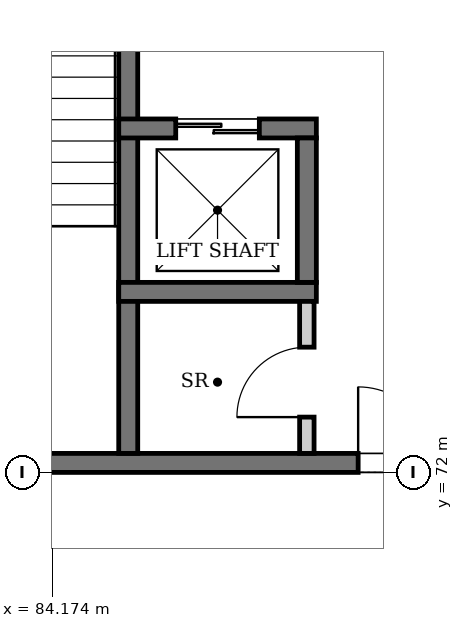
"""IFC4 building model, lengths in metres.
Left out: names, types, materials, properties, quantities, classifications, styles, units other than length and angle.
Written with IfcOpenShell. Run it as: python <this file> out.ifc"""

import sys

from ifc_helpers import new_model, si_unit, direction, frame, frame_2d, origin, place, context, subcontext, project, spatial, rectangle, extrude, element, fill, save


model = new_model("IFC4")
c1 = context("Model", 3, precision=1e-05, world=origin(), true_north=direction((0.0, 1.0)))
c2 = subcontext(c1, "Body", "Model", "MODEL_VIEW")
j1 = project(units=[si_unit("LENGTHUNIT", "METRE"), si_unit("PLANEANGLEUNIT", "RADIAN")], contexts=[c1])
p1 = place(None, origin())
s1 = spatial("IfcSite", under=j1, at=p1, CompositionType="ELEMENT")
p2 = place(p1, origin())
s2 = spatial("IfcBuilding", under=s1, at=p2, CompositionType="ELEMENT")
p3 = place(p2, frame((0.0, 0.0, 6.0)))
s3 = spatial("IfcBuildingStorey", under=s2, at=p3, CompositionType="ELEMENT", Elevation=6.0)
p4 = place(p3, frame((81.25, 72.125, 0.0), z_axis=(0.0, 0.0, 1.0), x_axis=(1.0, 0.0, 0.0)))
e1 = element("IfcWall", 1, at=p4, inside=s3, PredefinedType="SHEAR", context=c2, shape_type="SweptSolid", body=[
    extrude(rectangle(XDim=8.5, YDim=0.25, at=frame_2d((4.25, 0.0))), origin(), (0.0, 0.0, 1.0), 4.5),
])
p5 = place(p4, frame((6.95, 0.0, 0.0)))
e2 = element("IfcOpeningElement", 2, at=p5, cuts=e1, PredefinedType="OPENING", context=c2, shape_type="SweptSolid", body=[
    extrude(rectangle(XDim=1.0, YDim=2.1, at=frame_2d((0.5, 1.05))), frame((0.0, 0.135, 0.0), z_axis=(0.0, -1.0, 0.0), x_axis=(1.0, 0.0, 0.0)), (0.0, 0.0, 1.0), 0.27),
])
p6 = place(p3, frame((85.175, 80.4, 0.0), z_axis=(0.0, 0.0, 1.0), x_axis=(0.0, -1.0, 0.0)))
e3 = element("IfcWall", 3, at=p6, inside=s3, PredefinedType="SOLIDWALL", context=c2, shape_type="SweptSolid", body=[
    extrude(rectangle(XDim=8.15, YDim=0.25, at=frame_2d((4.075, 0.0))), origin(), (0.0, 0.0, 1.0), 4.25),
])
p7 = place(p6, frame((0.4, 0.0, 0.0)))
e4 = element("IfcOpeningElement", 4, at=p7, cuts=e3, PredefinedType="OPENING", context=c2, shape_type="SweptSolid", body=[
    extrude(rectangle(XDim=1.0, YDim=2.1, at=frame_2d((0.5, 1.05))), frame((0.0, 0.135, 0.0), z_axis=(0.0, -1.0, 0.0), x_axis=(1.0, 0.0, 0.0)), (0.0, 0.0, 1.0), 0.27),
])
p8 = place(p3, frame((85.05, 74.375, 0.0), z_axis=(0.0, 0.0, 1.0), x_axis=(1.0, 0.0, 0.0)))
e5 = element("IfcWall", 5, at=p8, inside=s3, PredefinedType="SOLIDWALL", context=c2, shape_type="SweptSolid", body=[
    extrude(rectangle(XDim=2.6, YDim=0.25, at=frame_2d((1.3, 0.0))), origin(), (0.0, 0.0, 1.0), 4.5),
])
p9 = place(p3, frame((85.05, 76.525, 0.0), z_axis=(0.0, 0.0, 1.0), x_axis=(1.0, 0.0, 0.0)))
e6 = element("IfcWall", 6, at=p9, inside=s3, PredefinedType="SOLIDWALL", context=c2, shape_type="SweptSolid", body=[
    extrude(rectangle(XDim=2.6, YDim=0.25, at=frame_2d((1.3, 0.0))), origin(), (0.0, 0.0, 1.0), 4.5),
])
p10 = place(p9, frame((0.75, 0.0, 0.0)))
e7 = element("IfcOpeningElement", 7, at=p10, cuts=e6, PredefinedType="OPENING", context=c2, shape_type="SweptSolid", body=[
    extrude(rectangle(XDim=1.1, YDim=2.1, at=frame_2d((0.55, 1.05))), frame((0.0, 0.135, 0.0), z_axis=(0.0, -1.0, 0.0), x_axis=(1.0, 0.0, 0.0)), (0.0, 0.0, 1.0), 0.27),
])
p11 = place(p3, frame((87.525, 74.5, 0.0), z_axis=(0.0, 0.0, 1.0), x_axis=(0.0, 1.0, 0.0)))
e8 = element("IfcWall", 8, at=p11, inside=s3, PredefinedType="SOLIDWALL", context=c2, shape_type="SweptSolid", body=[
    extrude(rectangle(XDim=1.9, YDim=0.25, at=frame_2d((0.95, 0.0))), origin(), (0.0, 0.0, 1.0), 4.5),
])
p12 = place(p3, frame((87.525, 72.25, 0.0), z_axis=(0.0, 0.0, 1.0), x_axis=(0.0, 1.0, 0.0)))
e9 = element("IfcWall", 9, at=p12, inside=s3, PredefinedType="PARTITIONING", context=c2, shape_type="SweptSolid", body=[
    extrude(rectangle(XDim=2.0, YDim=0.19, at=frame_2d((1.0, 0.0))), origin(), (0.0, 0.0, 1.0), 4.25),
])
p13 = place(p12, frame((0.478, 0.0, 0.0)))
e10 = element("IfcOpeningElement", 10, at=p13, cuts=e9, PredefinedType="OPENING", context=c2, shape_type="SweptSolid", body=[
    extrude(rectangle(XDim=0.92, YDim=2.1, at=frame_2d((0.46, 1.05))), frame((0.0, 0.105, 0.0), z_axis=(0.0, -1.0, 0.0), x_axis=(1.0, 0.0, 0.0)), (0.0, 0.0, 1.0), 0.21),
])
p14 = place(p10, origin())
e11 = element("IfcDoor", 11, at=p14, inside=s3, OperationType="DOUBLE_DOOR_SLIDING", PredefinedType="DOOR", context=c2, shape_type="SweptSolid", body=[
    extrude(rectangle(XDim=1.1, YDim=2.1, at=frame_2d((0.55, 1.05))), frame((0.0, 0.025, 0.0), z_axis=(0.0, -1.0, 0.0), x_axis=(1.0, 0.0, 0.0)), (0.0, 0.0, 1.0), 0.05),
])
fill(e7, e11)
p15 = place(p5, origin())
e12 = element("IfcDoor", 12, at=p15, inside=s3, OperationType="SINGLE_SWING_LEFT", PredefinedType="DOOR", context=c2, shape_type="SweptSolid", body=[
    extrude(rectangle(XDim=1.0, YDim=2.1, at=frame_2d((0.5, 1.05))), frame((0.0, 0.025, 0.0), z_axis=(0.0, -1.0, 0.0), x_axis=(1.0, 0.0, 0.0)), (0.0, 0.0, 1.0), 0.05),
])
fill(e2, e12)
p16 = place(p13, origin())
e13 = element("IfcDoor", 13, at=p16, inside=s3, OperationType="SINGLE_SWING_LEFT", PredefinedType="DOOR", context=c2, shape_type="SweptSolid", body=[
    extrude(rectangle(XDim=0.92, YDim=2.1, at=frame_2d((0.46, 1.05))), frame((0.0, 0.025, 0.0), z_axis=(0.0, -1.0, 0.0), x_axis=(1.0, 0.0, 0.0)), (0.0, 0.0, 1.0), 0.05),
])
fill(e10, e13)
save(model, sys.argv[1])
